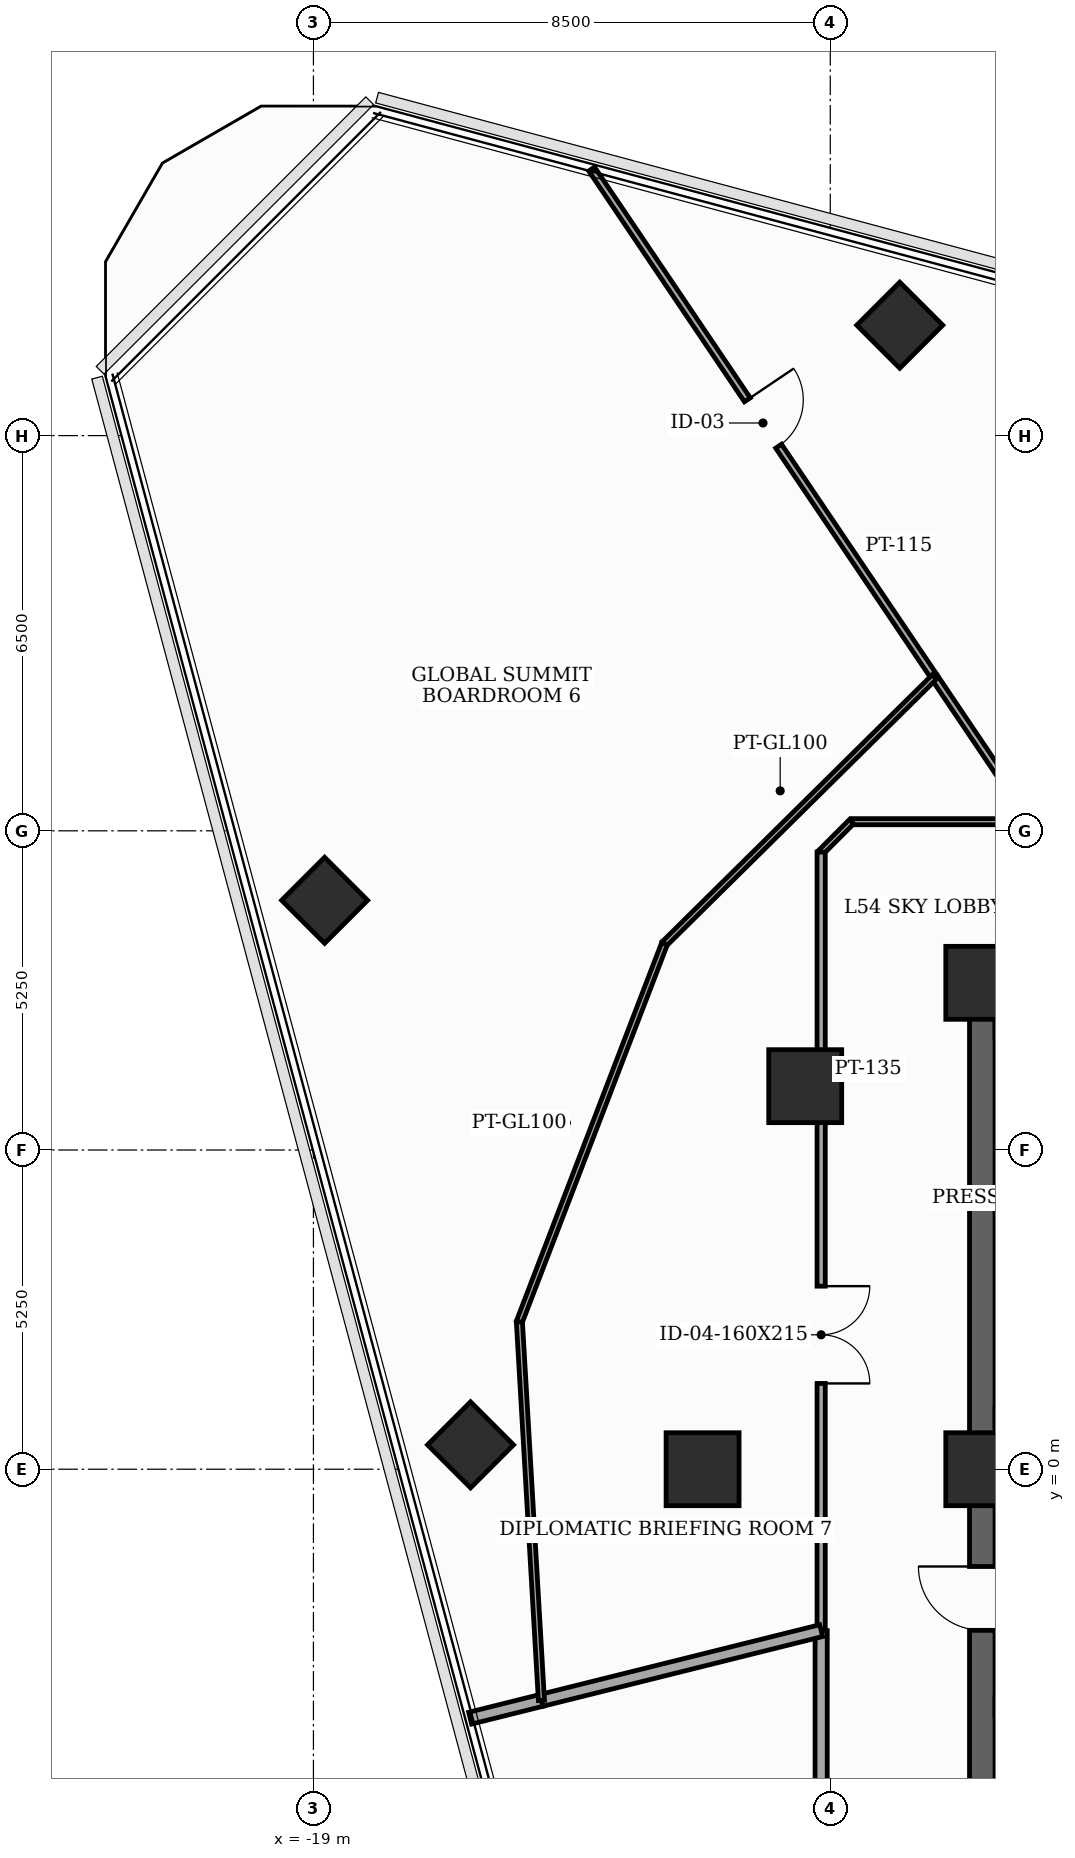
"""IFC4 building model, lengths in metres.
Left out: names, types, materials, properties, quantities, classifications, styles, units other than length and angle.
Written with IfcOpenShell. Run it as: python <this file> out.ifc"""

import sys

from ifc_helpers import new_model, si_unit, direction, frame, frame_2d, origin, origin_2d, place, context, subcontext, project, spatial, rectangle, extrude, element, fill, save


model = new_model("IFC4")
c1 = context("Model", 3, precision=1e-05, world=origin(), true_north=direction((0.0, 1.0)))
c2 = subcontext(c1, "Body", "Model", "MODEL_VIEW")
j1 = project(units=[si_unit("LENGTHUNIT", "METRE"), si_unit("PLANEANGLEUNIT", "RADIAN")], contexts=[c1])
p1 = place(None, origin())
s1 = spatial("IfcSite", under=j1, at=p1, CompositionType="ELEMENT")
p2 = place(p1, origin())
s2 = spatial("IfcBuilding", under=s1, at=p2, CompositionType="ELEMENT")
p3 = place(p2, frame((0.0, 0.0, 210.1)))
s3 = spatial("IfcBuildingStorey", under=s2, at=p3, CompositionType="ELEMENT", Elevation=210.1)
for number, where, z_axis, x_axis in (
    (1, (-8.0, 8.0, 0.0), (0.0, 0.0, 1.0), (1.0, 0.0, 0.0)),
    (2, (-8.0, 0.0, 0.0), (0.0, 0.0, 1.0), (1.0, 0.0, 0.0)),
    (3, (-10.912, 6.3, 0.0), (0.0, 0.0, 1.0), (1.0, 0.0, 0.0)),
    (4, (-12.6, 0.0, 0.0), (0.0, 0.0, 1.0), (1.0, 0.0, 0.0)),
):
    element("IfcColumn", number, at=place(p3, frame(where, z_axis=z_axis, x_axis=x_axis)), inside=s3, PredefinedType="COLUMN", context=c2, shape_type="SweptSolid", body=[
        extrude(rectangle(XDim=1.2, YDim=1.2, at=origin_2d()), origin(), (0.0, 0.0, 1.0), 3.7),
    ])
for number, where, z_axis, x_axis in (
    (5, (-9.357, 18.816, 0.0), (0.0, 0.0, 1.0), (0.707, 0.707, 0.0)),
    (6, (-18.816, 9.357, 0.0), (0.0, 0.0, 1.0), (0.707, 0.707, 0.0)),
    (7, (-16.416, 0.401, 0.0), (0.0, 0.0, 1.0), (0.707, 0.707, 0.0)),
):
    element("IfcColumn", number, at=place(p3, frame(where, z_axis=z_axis, x_axis=x_axis)), inside=s3, PredefinedType="COLUMN", context=c2, shape_type="SweptSolid", body=[
        extrude(rectangle(XDim=1.0, YDim=1.0, at=origin_2d()), origin(), (0.0, 0.0, 1.0), 3.7),
    ])
p4 = place(p3, frame((-8.0, -8.0, 0.0), z_axis=(0.0, 0.0, 1.0), x_axis=(0.0, 1.0, 0.0)))
e8 = element("IfcWall", 8, at=p4, inside=s3, PredefinedType="SHEAR", context=c2, shape_type="SweptSolid", body=[
    extrude(rectangle(XDim=16.0, YDim=0.42, at=frame_2d((8.0, 0.0))), origin(), (0.0, 0.0, 1.0), 3.46),
])
p5 = place(p4, frame((0.761, 0.0, 0.0)))
e9 = element("IfcOpeningElement", 9, at=p5, cuts=e8, PredefinedType="OPENING", context=c2, shape_type="SweptSolid", body=[
    extrude(rectangle(XDim=0.85, YDim=2.02, at=frame_2d((0.425, 1.01))), frame((0.0, 0.22, 0.0), z_axis=(0.0, -1.0, 0.0), x_axis=(1.0, 0.0, 0.0)), (0.0, 0.0, 1.0), 0.44),
])
p6 = place(p4, frame((5.35, 0.0, 0.0)))
e10 = element("IfcOpeningElement", 10, at=p6, cuts=e8, PredefinedType="OPENING", context=c2, shape_type="SweptSolid", body=[
    extrude(rectangle(XDim=1.05, YDim=2.15, at=frame_2d((0.525, 1.075))), frame((0.0, 0.22, 0.0), z_axis=(0.0, -1.0, 0.0), x_axis=(1.0, 0.0, 0.0)), (0.0, 0.0, 1.0), 0.44),
])
p7 = place(p3, frame((-8.0, 8.0, 0.0), z_axis=(0.0, 0.0, 1.0), x_axis=(1.0, 0.0, 0.0)))
e11 = element("IfcWall", 11, at=p7, inside=s3, PredefinedType="SHEAR", context=c2, shape_type="SweptSolid", body=[
    extrude(rectangle(XDim=16.0, YDim=0.42, at=frame_2d((8.0, 0.0))), origin(), (0.0, 0.0, 1.0), 3.46),
])
p8 = place(p7, frame((7.1, 0.0, 0.0)))
e12 = element("IfcOpeningElement", 12, at=p8, cuts=e11, PredefinedType="OPENING", context=c2, shape_type="SweptSolid", body=[
    extrude(rectangle(XDim=1.8, YDim=2.15, at=frame_2d((0.9, 1.075))), frame((0.0, 0.22, 0.0), z_axis=(0.0, -1.0, 0.0), x_axis=(1.0, 0.0, 0.0)), (0.0, 0.0, 1.0), 0.44),
])
p9 = place(p3, frame((-7.79, 0.85, 0.0), z_axis=(0.0, 0.0, 1.0), x_axis=(1.0, 0.0, 0.0)))
e13 = element("IfcWall", 13, at=p9, inside=s3, PredefinedType="SHEAR", context=c2, shape_type="SweptSolid", body=[
    extrude(rectangle(XDim=3.34, YDim=0.3, at=frame_2d((1.67, 0.0))), origin(), (0.0, 0.0, 1.0), 3.46),
])
p10 = place(p9, frame((1.85, 0.0, 0.0)))
e14 = element("IfcOpeningElement", 14, at=p10, cuts=e13, PredefinedType="OPENING", context=c2, shape_type="SweptSolid", body=[
    extrude(rectangle(XDim=1.05, YDim=2.15, at=frame_2d((0.525, 1.075))), frame((0.0, 0.16, 0.0), z_axis=(0.0, -1.0, 0.0), x_axis=(1.0, 0.0, 0.0)), (0.0, 0.0, 1.0), 0.32),
])
p11 = place(p3, frame((-7.79, 7.26, 0.0), z_axis=(0.0, 0.0, 1.0), x_axis=(1.0, 0.0, 0.0)))
e15 = element("IfcWall", 15, at=p11, inside=s3, PredefinedType="SHEAR", context=c2, shape_type="SweptSolid", body=[
    extrude(rectangle(XDim=3.34, YDim=0.3, at=frame_2d((1.67, 0.0))), origin(), (0.0, 0.0, 1.0), 3.46),
])
p12 = place(p3, frame((-7.79, -3.9, 0.0), z_axis=(0.0, 0.0, 1.0), x_axis=(1.0, 0.0, 0.0)))
e16 = element("IfcWall", 16, at=p12, inside=s3, PredefinedType="SHEAR", context=c2, shape_type="SweptSolid", body=[
    extrude(rectangle(XDim=3.34, YDim=0.3, at=frame_2d((1.67, 0.0))), origin(), (0.0, 0.0, 1.0), 3.46),
])
p13 = place(p12, frame((1.27, 0.0, 0.0)))
e17 = element("IfcOpeningElement", 17, at=p13, cuts=e16, PredefinedType="OPENING", context=c2, shape_type="SweptSolid", body=[
    extrude(rectangle(XDim=1.1, YDim=2.1, at=frame_2d((0.55, 1.05))), frame((0.0, 0.16, 0.0), z_axis=(0.0, -1.0, 0.0), x_axis=(1.0, 0.0, 0.0)), (0.0, 0.0, 1.0), 0.32),
])
p14 = place(p3, frame((-10.65, -2.655, 0.0), z_axis=(0.0, 0.0, 1.0), x_axis=(0.0, -1.0, 0.0)))
e18 = element("IfcWall", 18, at=p14, inside=s3, PredefinedType="SOLIDWALL", context=c2, shape_type="SweptSolid", body=[
    extrude(rectangle(XDim=7.495, YDim=0.2, at=frame_2d((3.748, 0.0))), origin(), (0.0, 0.0, 1.0), 2.045),
])
p15 = place(p3, frame((-7.184, 10.65, 0.0), z_axis=(0.0, 0.0, 1.0), x_axis=(-1.0, 0.0, 0.0)))
e19 = element("IfcWall", 19, at=p15, inside=s3, PredefinedType="MOVABLE", context=c2, shape_type="SweptSolid", body=[
    extrude(rectangle(XDim=2.966, YDim=0.1, at=frame_2d((1.483, 0.0))), origin(), (0.0, 0.0, 1.0), 2.045),
])
p16 = place(p3, frame((-10.15, 10.65, 0.0), z_axis=(0.0, 0.0, 1.0), x_axis=(-0.707106781187, -0.707106781187, 0.0)))
e20 = element("IfcWall", 20, at=p16, inside=s3, PredefinedType="MOVABLE", context=c2, shape_type="SweptSolid", body=[
    extrude(rectangle(XDim=0.707, YDim=0.1, at=frame_2d((0.354, 0.0))), origin(), (0.0, 0.0, 1.0), 3.46),
])
p17 = place(p3, frame((-10.65, 10.15, 0.0), z_axis=(0.0, 0.0, 1.0), x_axis=(0.0, -1.0, 0.0)))
e21 = element("IfcWall", 21, at=p17, inside=s3, PredefinedType="PARTITIONING", context=c2, shape_type="SweptSolid", body=[
    extrude(rectangle(XDim=12.805, YDim=0.135, at=frame_2d((6.402, 0.0))), origin(), (0.0, 0.0, 1.0), 2.845),
])
p18 = place(p17, frame((7.139, 0.0, 0.0)))
e22 = element("IfcOpeningElement", 22, at=p18, cuts=e21, PredefinedType="OPENING", context=c2, shape_type="SweptSolid", body=[
    extrude(rectangle(XDim=1.6, YDim=2.15, at=frame_2d((0.8, 1.075))), frame((0.0, 0.077, 0.0), z_axis=(0.0, -1.0, 0.0), x_axis=(1.0, 0.0, 0.0)), (0.0, 0.0, 1.0), 0.155),
])
p19 = place(p3, frame((-15.25, -3.802, 0.0), z_axis=(0.0, 0.0, 1.0), x_axis=(-0.970237467776, -0.24215543794, 0.0)))
e23 = element("IfcWall", 23, at=p19, inside=s3, PredefinedType="SOLIDWALL", context=c2, shape_type="SweptSolid", body=[
    extrude(rectangle(XDim=1.209, YDim=0.2, at=frame_2d((0.604, 0.0))), origin(), (0.0, 0.0, 1.0), 2.045),
])
p20 = place(p3, frame((-10.65, -2.655, 0.0), z_axis=(0.0, 0.0, 1.0), x_axis=(-0.970293770758, -0.241929738617, 0.0)))
e24 = element("IfcWall", 24, at=p20, inside=s3, PredefinedType="SOLIDWALL", context=c2, shape_type="SweptSolid", body=[
    extrude(rectangle(XDim=4.741, YDim=0.2, at=frame_2d((2.371, 0.0))), origin(), (0.0, 0.0, 1.0), 2.045),
])
p21 = place(p3, frame((-14.424, 21.385, 0.0), z_axis=(0.0, 0.0, 1.0), x_axis=(0.559175745777, -0.829049145307, 0.0)))
e25 = element("IfcWall", 25, at=p21, inside=s3, PredefinedType="PARTITIONING", context=c2, shape_type="SweptSolid", body=[
    extrude(rectangle(XDim=10.078, YDim=0.115, at=frame_2d((5.039, 0.0))), origin(), (0.0, 0.0, 1.0), 2.045),
])
p22 = place(p21, frame((4.579, 0.0, 0.0)))
e26 = element("IfcOpeningElement", 26, at=p22, cuts=e25, PredefinedType="OPENING", context=c2, shape_type="SweptSolid", body=[
    extrude(rectangle(XDim=0.92, YDim=2.0, at=frame_2d((0.46, 1.0))), frame((0.0, 0.067, 0.0), z_axis=(0.0, -1.0, 0.0), x_axis=(1.0, 0.0, 0.0)), (0.0, 0.0, 1.0), 0.135),
])
p23 = place(p3, frame((-8.789, 13.03, 0.0), z_axis=(0.0, 0.0, 1.0), x_axis=(0.559088648107, -0.829107884149, 0.0)))
e27 = element("IfcWall", 27, at=p23, inside=s3, PredefinedType="PARTITIONING", context=c2, shape_type="SweptSolid", body=[
    extrude(rectangle(XDim=2.871, YDim=0.115, at=frame_2d((1.435, 0.0))), origin(), (0.0, 0.0, 1.0), 2.045),
])
p24 = place(p3, frame((-15.25, -3.802, 0.0), z_axis=(0.0, 0.0, 1.0), x_axis=(-0.058192086898, 0.998305404685, 0.0)))
e28 = element("IfcWall", 28, at=p24, inside=s3, PredefinedType="MOVABLE", context=c2, shape_type="SweptSolid", body=[
    extrude(rectangle(XDim=6.239, YDim=0.1, at=frame_2d((3.119, 0.0))), origin(), (0.0, 0.0, 1.0), 2.045),
])
p25 = place(p3, frame((-15.613, 2.426, 0.0), z_axis=(0.0, 0.0, 1.0), x_axis=(0.358379670906, 0.933575927004, 0.0)))
e29 = element("IfcWall", 29, at=p25, inside=s3, PredefinedType="MOVABLE", context=c2, shape_type="SweptSolid", body=[
    extrude(rectangle(XDim=6.66, YDim=0.1, at=frame_2d((3.33, 0.0))), origin(), (0.0, 0.0, 1.0), 2.045),
])
p26 = place(p3, frame((-13.226, 8.644, 0.0), z_axis=(0.0, 0.0, 1.0), x_axis=(0.711184246493, 0.703005666791, 0.0)))
e30 = element("IfcWall", 30, at=p26, inside=s3, PredefinedType="MOVABLE", context=c2, shape_type="SweptSolid", body=[
    extrude(rectangle(XDim=6.239, YDim=0.1, at=frame_2d((3.12, 0.0))), origin(), (0.0, 0.0, 1.0), 2.045),
])
p27 = place(p6, origin())
e31 = element("IfcDoor", 31, at=p27, inside=s3, OperationType="SINGLE_SWING_RIGHT", PredefinedType="DOOR", context=c2, shape_type="SweptSolid", body=[
    extrude(rectangle(XDim=1.05, YDim=2.15, at=frame_2d((0.525, 1.075))), frame((0.0, 0.025, 0.0), z_axis=(0.0, -1.0, 0.0), x_axis=(1.0, 0.0, 0.0)), (0.0, 0.0, 1.0), 0.05),
])
fill(e10, e31)
p28 = place(p18, origin())
e32 = element("IfcDoor", 32, at=p28, inside=s3, OperationType="DOUBLE_DOOR_SINGLE_SWING", PredefinedType="DOOR", context=c2, shape_type="SweptSolid", body=[
    extrude(rectangle(XDim=1.6, YDim=2.15, at=frame_2d((0.8, 1.075))), frame((0.0, 0.025, 0.0), z_axis=(0.0, -1.0, 0.0), x_axis=(1.0, 0.0, 0.0)), (0.0, 0.0, 1.0), 0.05),
])
fill(e22, e32)
p29 = place(p22, origin())
e33 = element("IfcDoor", 33, at=p29, inside=s3, OperationType="SINGLE_SWING_LEFT", PredefinedType="DOOR", context=c2, shape_type="SweptSolid", body=[
    extrude(rectangle(XDim=0.92, YDim=2.0, at=frame_2d((0.46, 1.0))), frame((0.0, 0.025, 0.0), z_axis=(0.0, -1.0, 0.0), x_axis=(1.0, 0.0, 0.0)), (0.0, 0.0, 1.0), 0.05),
])
fill(e26, e33)
save(model, sys.argv[1])
